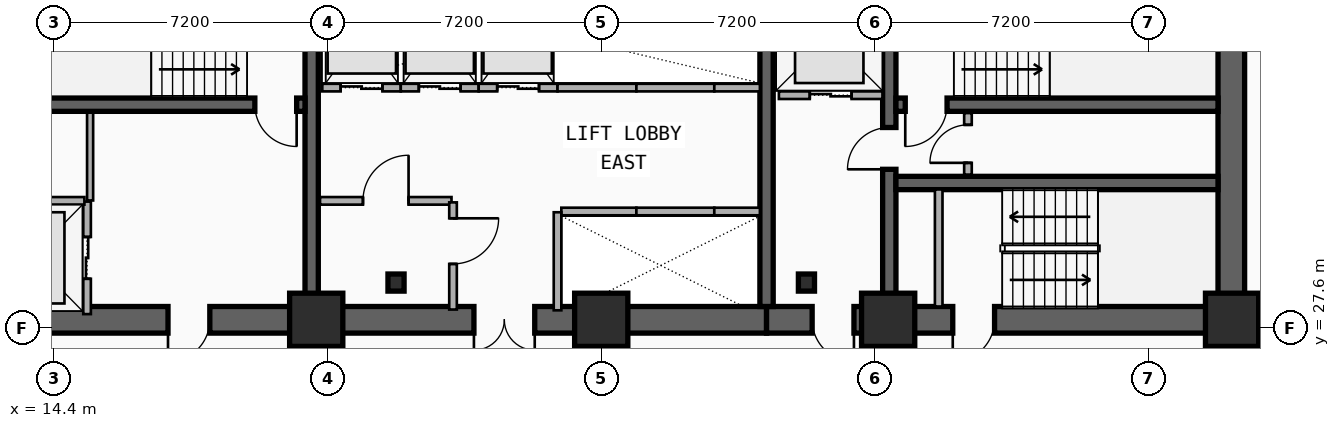
"""IFC4 building model, lengths in metres.
Left out: names, types, materials, properties, quantities, classifications, styles, units other than length and angle.
Written with IfcOpenShell. Run it as: python <this file> out.ifc"""

import sys

from ifc_helpers import new_model, si_unit, direction, frame, frame_2d, origin, origin_2d, place, context, subcontext, project, spatial, rectangle, i_section, extrude, element, fill, save


model = new_model("IFC4")
c1 = context("Model", 3, precision=1e-05, world=origin(), true_north=direction((0.0, 1.0)))
c2 = subcontext(c1, "Body", "Model", "MODEL_VIEW")
j1 = project(units=[si_unit("LENGTHUNIT", "METRE"), si_unit("PLANEANGLEUNIT", "RADIAN")], contexts=[c1])
p1 = place(None, origin())
s1 = spatial("IfcSite", under=j1, at=p1, CompositionType="ELEMENT")
p2 = place(p1, origin())
s2 = spatial("IfcBuilding", under=s1, at=p2, CompositionType="ELEMENT")
p3 = place(p2, frame((0.0, 0.0, 50.0)))
s3 = spatial("IfcBuildingStorey", under=s2, at=p3, CompositionType="ELEMENT", Elevation=50.0)
p4 = place(p3, frame((21.18, 27.82, 0.0), z_axis=(0.0, 0.0, 1.0), x_axis=(-1.0, 0.0, 0.0)))
e1 = element("IfcWall", 1, at=p4, inside=s3, PredefinedType="SHEAR", context=c2, shape_type="SweptSolid", body=[
    extrude(rectangle(XDim=9.03, YDim=0.7, at=frame_2d((4.515, 0.0))), origin(), (0.0, 0.0, 1.0), 3.5),
])
p5 = place(p4, frame((2.68, 0.0, 0.0)))
e2 = element("IfcOpeningElement", 2, at=p5, cuts=e1, PredefinedType="OPENING", context=c2, shape_type="SweptSolid", body=[
    extrude(rectangle(XDim=1.1, YDim=2.15, at=frame_2d((0.55, 1.075))), frame((0.0, 0.36, 0.0), z_axis=(0.0, -1.0, 0.0), x_axis=(1.0, 0.0, 0.0)), (0.0, 0.0, 1.0), 0.72),
])
p6 = place(p3, frame((33.15, 27.82, 0.0), z_axis=(0.0, 0.0, 1.0), x_axis=(-1.0, 0.0, 0.0)))
e3 = element("IfcWall", 3, at=p6, inside=s3, PredefinedType="SHEAR", context=c2, shape_type="SweptSolid", body=[
    extrude(rectangle(XDim=11.97, YDim=0.7, at=frame_2d((5.985, 0.0))), origin(), (0.0, 0.0, 1.0), 3.5),
])
p7 = place(p6, frame((6.1, 0.0, 0.0)))
e4 = element("IfcOpeningElement", 4, at=p7, cuts=e3, PredefinedType="OPENING", context=c2, shape_type="SweptSolid", body=[
    extrude(rectangle(XDim=1.6, YDim=2.2, at=frame_2d((0.8, 1.1))), frame((0.0, 0.36, 0.0), z_axis=(0.0, -1.0, 0.0), x_axis=(1.0, 0.0, 0.0)), (0.0, 0.0, 1.0), 0.72),
])
p8 = place(p3, frame((45.38, 27.82, 0.0), z_axis=(0.0, 0.0, 1.0), x_axis=(-1.0, 0.0, 0.0)))
e5 = element("IfcWall", 5, at=p8, inside=s3, PredefinedType="SHEAR", context=c2, shape_type="SweptSolid", body=[
    extrude(rectangle(XDim=12.23, YDim=0.7, at=frame_2d((6.115, 0.0))), origin(), (0.0, 0.0, 1.0), 3.5),
])
p9 = place(p8, frame((9.93, 0.0, 0.0)))
e6 = element("IfcOpeningElement", 6, at=p9, cuts=e5, PredefinedType="OPENING", context=c2, shape_type="SweptSolid", body=[
    extrude(rectangle(XDim=1.1, YDim=2.15, at=frame_2d((0.55, 1.075))), frame((0.0, 0.36, 0.0), z_axis=(0.0, -1.0, 0.0), x_axis=(1.0, 0.0, 0.0)), (0.0, 0.0, 1.0), 0.72),
])
p10 = place(p8, frame((6.23, 0.0, 0.0)))
e7 = element("IfcOpeningElement", 7, at=p10, cuts=e5, PredefinedType="OPENING", context=c2, shape_type="SweptSolid", body=[
    extrude(rectangle(XDim=1.1, YDim=2.15, at=frame_2d((0.55, 1.075))), frame((0.0, 0.36, 0.0), z_axis=(0.0, -1.0, 0.0), x_axis=(1.0, 0.0, 0.0)), (0.0, 0.0, 1.0), 0.72),
])
p11 = place(p3, frame((45.38, 28.17, 0.0), z_axis=(0.0, 0.0, 1.0), x_axis=(0.0, 1.0, 0.0)))
e8 = element("IfcWall", 8, at=p11, inside=s3, PredefinedType="SHEAR", context=c2, shape_type="SweptSolid", body=[
    extrude(rectangle(XDim=8.53, YDim=0.7, at=frame_2d((4.265, 0.0))), origin(), (0.0, 0.0, 1.0), 3.5),
])
for number, where, z_axis, x_axis in (
    (9, (21.18, 28.17, 0.0), (0.0, 0.0, 1.0), (0.0, 1.0, 0.0)),
    (10, (33.15, 28.17, 0.0), (0.0, 0.0, 1.0), (0.0, 1.0, 0.0)),
):
    element("IfcWall", number, at=place(p3, frame(where, z_axis=z_axis, x_axis=x_axis)), inside=s3, PredefinedType="SHEAR", context=c2, shape_type="SweptSolid", body=[
        extrude(rectangle(XDim=8.53, YDim=0.35, at=frame_2d((4.265, 0.0))), origin(), (0.0, 0.0, 1.0), 3.5),
    ])
p12 = place(p3, frame((36.38, 28.17, 0.0), z_axis=(0.0, 0.0, 1.0), x_axis=(0.0, 1.0, 0.0)))
e11 = element("IfcWall", 11, at=p12, inside=s3, PredefinedType="SHEAR", context=c2, shape_type="SweptSolid", body=[
    extrude(rectangle(XDim=8.53, YDim=0.35, at=frame_2d((4.265, 0.0))), origin(), (0.0, 0.0, 1.0), 3.5),
])
p13 = place(p12, frame((3.61, 0.0, 0.0)))
e12 = element("IfcOpeningElement", 12, at=p13, cuts=e11, PredefinedType="OPENING", context=c2, shape_type="SweptSolid", body=[
    extrude(rectangle(XDim=1.1, YDim=2.15, at=frame_2d((0.55, 1.075))), frame((0.0, 0.185, 0.0), z_axis=(0.0, -1.0, 0.0), x_axis=(1.0, 0.0, 0.0)), (0.0, 0.0, 1.0), 0.37),
])
p14 = place(p3, frame((21.005, 33.48, 0.0), z_axis=(0.0, 0.0, 1.0), x_axis=(-1.0, 0.0, 0.0)))
e13 = element("IfcWall", 13, at=p14, inside=s3, PredefinedType="SHEAR", context=c2, shape_type="SweptSolid", body=[
    extrude(rectangle(XDim=8.505, YDim=0.35, at=frame_2d((4.252, 0.0))), origin(), (0.0, 0.0, 1.0), 3.5),
])
p15 = place(p14, frame((0.22, 0.0, 0.0)))
e14 = element("IfcOpeningElement", 14, at=p15, cuts=e13, PredefinedType="OPENING", context=c2, shape_type="SweptSolid", body=[
    extrude(rectangle(XDim=1.1, YDim=2.15, at=frame_2d((0.55, 1.075))), frame((0.0, 0.185, 0.0), z_axis=(0.0, -1.0, 0.0), x_axis=(1.0, 0.0, 0.0)), (0.0, 0.0, 1.0), 0.37),
])
p16 = place(p3, frame((45.03, 33.48, 0.0), z_axis=(0.0, 0.0, 1.0), x_axis=(-1.0, 0.0, 0.0)))
e15 = element("IfcWall", 15, at=p16, inside=s3, PredefinedType="SHEAR", context=c2, shape_type="SweptSolid", body=[
    extrude(rectangle(XDim=8.475, YDim=0.35, at=frame_2d((4.238, 0.0))), origin(), (0.0, 0.0, 1.0), 3.5),
])
p17 = place(p16, frame((7.13, 0.0, 0.0)))
e16 = element("IfcOpeningElement", 16, at=p17, cuts=e15, PredefinedType="OPENING", context=c2, shape_type="SweptSolid", body=[
    extrude(rectangle(XDim=1.1, YDim=2.15, at=frame_2d((0.55, 1.075))), frame((0.0, 0.185, 0.0), z_axis=(0.0, -1.0, 0.0), x_axis=(1.0, 0.0, 0.0)), (0.0, 0.0, 1.0), 0.37),
])
p18 = place(p3, frame((36.555, 31.42, 0.0), z_axis=(0.0, 0.0, 1.0), x_axis=(1.0, 0.0, 0.0)))
e17 = element("IfcWall", 17, at=p18, inside=s3, PredefinedType="SHEAR", context=c2, shape_type="SweptSolid", body=[
    extrude(rectangle(XDim=8.475, YDim=0.35, at=frame_2d((4.238, 0.0))), origin(), (0.0, 0.0, 1.0), 3.5),
])
for number, where, z_axis, x_axis in (
    (18, (23.4, 28.8, 0.0), (0.0, 0.0, 1.0), (1.0, 0.0, 0.0)),
    (19, (34.2, 28.8, 0.0), (0.0, 0.0, 1.0), (1.0, 0.0, 0.0)),
):
    element("IfcColumn", number, at=place(p3, frame(where, z_axis=z_axis, x_axis=x_axis)), inside=s3, PredefinedType="COLUMN", context=c2, shape_type="SweptSolid", body=[
        extrude(i_section(OverallWidth=0.424, OverallDepth=0.45, WebThickness=0.041, FlangeThickness=0.065, FilletRadius=0.015, at=origin_2d()), origin(), (0.0, 0.0, 1.0), 3.5),
    ])
for number, where, z_axis, x_axis in (
    (20, (21.3, 27.82, 0.0), (0.0, 0.0, 1.0), (1.0, 0.0, 0.0)),
    (21, (28.8, 27.82, 0.0), (0.0, 0.0, 1.0), (1.0, 0.0, 0.0)),
    (22, (36.35, 27.82, 0.0), (0.0, 0.0, 1.0), (1.0, 0.0, 0.0)),
    (23, (45.4, 27.82, 0.0), (0.0, 0.0, 1.0), (1.0, 0.0, 0.0)),
):
    element("IfcColumn", number, at=place(p3, frame(where, z_axis=z_axis, x_axis=x_axis)), inside=s3, PredefinedType="COLUMN", context=c2, shape_type="SweptSolid", body=[
        extrude(rectangle(XDim=1.4, YDim=1.4, at=origin_2d()), origin(), (0.0, 0.0, 1.0), 3.5),
    ])
p19 = place(p3, frame((15.27, 27.97, 0.0), z_axis=(0.0, 0.0, 1.0), x_axis=(0.0, 1.0, 0.0)))
e24 = element("IfcWall", 24, at=p19, inside=s3, PredefinedType="PARTITIONING", context=c2, shape_type="SweptSolid", body=[
    extrude(rectangle(XDim=2.96, YDim=0.2, at=frame_2d((1.48, 0.0))), origin(), (0.0, 0.0, 1.0), 2.212),
])
p20 = place(p19, frame((0.93, 0.0, 0.0)))
e25 = element("IfcOpeningElement", 25, at=p20, cuts=e24, PredefinedType="OPENING", context=c2, shape_type="SweptSolid", body=[
    extrude(rectangle(XDim=1.1, YDim=2.15, at=frame_2d((0.55, 1.075))), frame((0.0, 0.11, 0.0), z_axis=(0.0, -1.0, 0.0), x_axis=(1.0, 0.0, 0.0)), (0.0, 0.0, 1.0), 0.22),
])
p21 = place(p3, frame((12.45, 30.95, 0.0), z_axis=(0.0, 0.0, 1.0), x_axis=(1.0, 0.0, 0.0)))
e26 = element("IfcWall", 26, at=p21, inside=s3, PredefinedType="PARTITIONING", context=c2, shape_type="SweptSolid", body=[
    extrude(rectangle(XDim=2.75, YDim=0.2, at=frame_2d((1.375, 0.0))), origin(), (0.0, 0.0, 1.0), 2.212),
])
p22 = place(p3, frame((33.475, 33.73, 0.0), z_axis=(0.0, 0.0, 1.0), x_axis=(1.0, 0.0, 0.0)))
e27 = element("IfcWall", 27, at=p22, inside=s3, PredefinedType="PARTITIONING", context=c2, shape_type="SweptSolid", body=[
    extrude(rectangle(XDim=2.725, YDim=0.2, at=frame_2d((1.362, 0.0))), origin(), (0.0, 0.0, 1.0), 2.212),
])
p23 = place(p22, frame((0.812, 0.0, 0.0)))
e28 = element("IfcOpeningElement", 28, at=p23, cuts=e27, PredefinedType="OPENING", context=c2, shape_type="SweptSolid", body=[
    extrude(rectangle(XDim=1.1, YDim=2.15, at=frame_2d((0.55, 1.075))), frame((0.0, 0.11, 0.0), z_axis=(0.0, -1.0, 0.0), x_axis=(1.0, 0.0, 0.0)), (0.0, 0.0, 1.0), 0.22),
])
p24 = place(p3, frame((27.75, 30.67, 0.0), z_axis=(0.0, 0.0, 1.0), x_axis=(1.0, 0.0, 0.0)))
e29 = element("IfcWall", 29, at=p24, inside=s3, PredefinedType="PARTITIONING", context=c2, shape_type="SweptSolid", body=[
    extrude(rectangle(XDim=1.975, YDim=0.2, at=frame_2d((0.988, 0.0))), origin(), (0.0, 0.0, 1.0), 2.212),
])
p25 = place(p3, frame((27.65, 28.07, 0.0), z_axis=(0.0, 0.0, 1.0), x_axis=(0.0, 1.0, 0.0)))
e30 = element("IfcWall", 30, at=p25, inside=s3, PredefinedType="PARTITIONING", context=c2, shape_type="SweptSolid", body=[
    extrude(rectangle(XDim=2.58, YDim=0.2, at=frame_2d((1.29, 0.0))), origin(), (0.0, 0.0, 1.0), 2.212),
])
p26 = place(p3, frame((29.725, 30.67, 0.0), z_axis=(0.0, 0.0, 1.0), x_axis=(1.0, 0.0, 0.0)))
e31 = element("IfcWall", 31, at=p26, inside=s3, PredefinedType="PARTITIONING", context=c2, shape_type="SweptSolid", body=[
    extrude(rectangle(XDim=2.05, YDim=0.2, at=frame_2d((1.025, 0.0))), origin(), (0.0, 0.0, 1.0), 2.62),
])
p27 = place(p3, frame((31.775, 30.67, 0.0), z_axis=(0.0, 0.0, 1.0), x_axis=(1.0, 0.0, 0.0)))
e32 = element("IfcWall", 32, at=p27, inside=s3, PredefinedType="PARTITIONING", context=c2, shape_type="SweptSolid", body=[
    extrude(rectangle(XDim=1.2, YDim=0.2, at=frame_2d((0.6, 0.0))), origin(), (0.0, 0.0, 1.0), 2.62),
])
p28 = place(p3, frame((21.46, 33.93, 0.0), z_axis=(0.0, 0.0, 1.0), x_axis=(1.0, 0.0, 0.0)))
e33 = element("IfcWall", 33, at=p28, inside=s3, PredefinedType="PARTITIONING", context=c2, shape_type="SweptSolid", body=[
    extrude(rectangle(XDim=2.065, YDim=0.2, at=frame_2d((1.032, 0.0))), origin(), (0.0, 0.0, 1.0), 2.212),
])
p29 = place(p28, frame((0.482, 0.0, 0.0)))
e34 = element("IfcOpeningElement", 34, at=p29, cuts=e33, PredefinedType="OPENING", context=c2, shape_type="SweptSolid", body=[
    extrude(rectangle(XDim=1.1, YDim=2.15, at=frame_2d((0.55, 1.075))), frame((0.0, 0.11, 0.0), z_axis=(0.0, -1.0, 0.0), x_axis=(1.0, 0.0, 0.0)), (0.0, 0.0, 1.0), 0.22),
])
p30 = place(p3, frame((23.525, 33.93, 0.0), z_axis=(0.0, 0.0, 1.0), x_axis=(1.0, 0.0, 0.0)))
e35 = element("IfcWall", 35, at=p30, inside=s3, PredefinedType="PARTITIONING", context=c2, shape_type="SweptSolid", body=[
    extrude(rectangle(XDim=2.05, YDim=0.2, at=frame_2d((1.025, 0.0))), origin(), (0.0, 0.0, 1.0), 3.24),
])
p31 = place(p30, frame((0.475, 0.0, 0.0)))
e36 = element("IfcOpeningElement", 36, at=p31, cuts=e35, PredefinedType="OPENING", context=c2, shape_type="SweptSolid", body=[
    extrude(rectangle(XDim=1.1, YDim=2.15, at=frame_2d((0.55, 1.075))), frame((0.0, 0.11, 0.0), z_axis=(0.0, -1.0, 0.0), x_axis=(1.0, 0.0, 0.0)), (0.0, 0.0, 1.0), 0.22),
])
p32 = place(p3, frame((25.575, 33.93, 0.0), z_axis=(0.0, 0.0, 1.0), x_axis=(1.0, 0.0, 0.0)))
e37 = element("IfcWall", 37, at=p32, inside=s3, PredefinedType="PARTITIONING", context=c2, shape_type="SweptSolid", body=[
    extrude(rectangle(XDim=2.075, YDim=0.2, at=frame_2d((1.038, 0.0))), origin(), (0.0, 0.0, 1.0), 3.24),
])
p33 = place(p32, frame((0.488, 0.0, 0.0)))
e38 = element("IfcOpeningElement", 38, at=p33, cuts=e37, PredefinedType="OPENING", context=c2, shape_type="SweptSolid", body=[
    extrude(rectangle(XDim=1.1, YDim=2.15, at=frame_2d((0.55, 1.075))), frame((0.0, 0.11, 0.0), z_axis=(0.0, -1.0, 0.0), x_axis=(1.0, 0.0, 0.0)), (0.0, 0.0, 1.0), 0.22),
])
p34 = place(p3, frame((27.65, 33.93, 0.0), z_axis=(0.0, 0.0, 1.0), x_axis=(1.0, 0.0, 0.0)))
e39 = element("IfcWall", 39, at=p34, inside=s3, PredefinedType="PARTITIONING", context=c2, shape_type="SweptSolid", body=[
    extrude(rectangle(XDim=2.075, YDim=0.2, at=frame_2d((1.038, 0.0))), origin(), (0.0, 0.0, 1.0), 2.212),
])
p35 = place(p3, frame((29.725, 33.93, 0.0), z_axis=(0.0, 0.0, 1.0), x_axis=(1.0, 0.0, 0.0)))
e40 = element("IfcWall", 40, at=p35, inside=s3, PredefinedType="PARTITIONING", context=c2, shape_type="SweptSolid", body=[
    extrude(rectangle(XDim=2.05, YDim=0.2, at=frame_2d((1.025, 0.0))), origin(), (0.0, 0.0, 1.0), 3.24),
])
p36 = place(p3, frame((31.775, 33.93, 0.0), z_axis=(0.0, 0.0, 1.0), x_axis=(1.0, 0.0, 0.0)))
e41 = element("IfcWall", 41, at=p36, inside=s3, PredefinedType="PARTITIONING", context=c2, shape_type="SweptSolid", body=[
    extrude(rectangle(XDim=1.2, YDim=0.2, at=frame_2d((0.6, 0.0))), origin(), (0.0, 0.0, 1.0), 3.24),
])
p37 = place(p3, frame((37.68, 28.17, 0.0), z_axis=(0.0, 0.0, 1.0), x_axis=(0.0, 1.0, 0.0)))
e42 = element("IfcWall", 42, at=p37, inside=s3, PredefinedType="PARTITIONING", context=c2, shape_type="SweptSolid", body=[
    extrude(rectangle(XDim=3.08, YDim=0.2, at=frame_2d((1.54, 0.0))), origin(), (0.0, 0.0, 1.0), 2.62),
])
p38 = place(p3, frame((38.45, 31.64, 0.0), z_axis=(0.0, 0.0, 1.0), x_axis=(0.0, 1.0, 0.0)))
e43 = element("IfcWall", 43, at=p38, inside=s3, PredefinedType="PARTITIONING", context=c2, shape_type="SweptSolid", body=[
    extrude(rectangle(XDim=1.62, YDim=0.2, at=frame_2d((0.81, 0.0))), origin(), (0.0, 0.0, 1.0), 3.24),
])
p39 = place(p38, frame((0.31, 0.0, 0.0)))
e44 = element("IfcOpeningElement", 44, at=p39, cuts=e43, PredefinedType="OPENING", context=c2, shape_type="SweptSolid", body=[
    extrude(rectangle(XDim=1.0, YDim=2.15, at=frame_2d((0.5, 1.075))), frame((0.0, 0.11, 0.0), z_axis=(0.0, -1.0, 0.0), x_axis=(1.0, 0.0, 0.0)), (0.0, 0.0, 1.0), 0.22),
])
p40 = place(p3, frame((21.4, 30.95, 0.0), z_axis=(0.0, 0.0, 1.0), x_axis=(1.0, 0.0, 0.0)))
e45 = element("IfcWall", 45, at=p40, inside=s3, PredefinedType="PARTITIONING", context=c2, shape_type="SweptSolid", body=[
    extrude(rectangle(XDim=3.46, YDim=0.2, at=frame_2d((1.73, 0.0))), origin(), (0.0, 0.0, 1.0), 2.28),
])
p41 = place(p40, frame((1.13, 0.0, 0.0)))
e46 = element("IfcOpeningElement", 46, at=p41, cuts=e45, PredefinedType="OPENING", context=c2, shape_type="SweptSolid", body=[
    extrude(rectangle(XDim=1.2, YDim=2.15, at=frame_2d((0.6, 1.075))), frame((0.0, 0.11, 0.0), z_axis=(0.0, -1.0, 0.0), x_axis=(1.0, 0.0, 0.0)), (0.0, 0.0, 1.0), 0.22),
])
p42 = place(p3, frame((24.9, 30.91, 0.0), z_axis=(0.0, 0.0, 1.0), x_axis=(0.0, -1.0, 0.0)))
e47 = element("IfcWall", 47, at=p42, inside=s3, PredefinedType="PARTITIONING", context=c2, shape_type="SweptSolid", body=[
    extrude(rectangle(XDim=2.82, YDim=0.2, at=frame_2d((1.41, 0.0))), origin(), (0.0, 0.0, 1.0), 2.62),
])
p43 = place(p42, frame((0.419, 0.0, 0.0)))
e48 = element("IfcOpeningElement", 48, at=p43, cuts=e47, PredefinedType="OPENING", context=c2, shape_type="SweptSolid", body=[
    extrude(rectangle(XDim=1.2, YDim=2.15, at=frame_2d((0.6, 1.075))), frame((0.0, 0.11, 0.0), z_axis=(0.0, -1.0, 0.0), x_axis=(1.0, 0.0, 0.0)), (0.0, 0.0, 1.0), 0.22),
])
p44 = place(p3, frame((15.35, 30.96, 0.0), z_axis=(0.0, 0.0, 1.0), x_axis=(0.0, 1.0, 0.0)))
e49 = element("IfcWall", 49, at=p44, inside=s3, PredefinedType="PARTITIONING", context=c2, shape_type="SweptSolid", body=[
    extrude(rectangle(XDim=2.31, YDim=0.16, at=frame_2d((1.155, 0.0))), origin(), (0.0, 0.0, 1.0), 3.24),
])
p45 = place(p3, frame((45.41, 27.6, 0.0), z_axis=(0.0, 0.0, 1.0), x_axis=(1.0, 0.0, 0.0)))
e50 = element("IfcWall", 50, at=p45, inside=s3, PredefinedType="PARTITIONING", context=c2, shape_type="SweptSolid", body=[
    extrude(rectangle(XDim=0.91, YDim=0.16, at=frame_2d((0.455, 0.0))), origin(), (0.0, 0.0, 1.0), 2.28),
])
p46 = place(p20, origin())
e51 = element("IfcDoor", 51, at=p46, inside=s3, OperationType="DOUBLE_DOOR_SLIDING", PredefinedType="DOOR", context=c2, shape_type="SweptSolid", body=[
    extrude(rectangle(XDim=1.1, YDim=2.15, at=frame_2d((0.55, 1.075))), frame((0.0, 0.025, 0.0), z_axis=(0.0, -1.0, 0.0), x_axis=(1.0, 0.0, 0.0)), (0.0, 0.0, 1.0), 0.05),
])
fill(e25, e51)
p47 = place(p23, origin())
e52 = element("IfcDoor", 52, at=p47, inside=s3, OperationType="DOUBLE_DOOR_SLIDING", PredefinedType="DOOR", context=c2, shape_type="SweptSolid", body=[
    extrude(rectangle(XDim=1.1, YDim=2.15, at=frame_2d((0.55, 1.075))), frame((0.0, 0.025, 0.0), z_axis=(0.0, -1.0, 0.0), x_axis=(1.0, 0.0, 0.0)), (0.0, 0.0, 1.0), 0.05),
])
fill(e28, e52)
p48 = place(p29, origin())
e53 = element("IfcDoor", 53, at=p48, inside=s3, OperationType="DOUBLE_DOOR_SLIDING", PredefinedType="DOOR", context=c2, shape_type="SweptSolid", body=[
    extrude(rectangle(XDim=1.1, YDim=2.15, at=frame_2d((0.55, 1.075))), frame((0.0, 0.025, 0.0), z_axis=(0.0, -1.0, 0.0), x_axis=(1.0, 0.0, 0.0)), (0.0, 0.0, 1.0), 0.05),
])
fill(e34, e53)
p49 = place(p31, origin())
e54 = element("IfcDoor", 54, at=p49, inside=s3, OperationType="DOUBLE_DOOR_SLIDING", PredefinedType="DOOR", context=c2, shape_type="SweptSolid", body=[
    extrude(rectangle(XDim=1.1, YDim=2.15, at=frame_2d((0.55, 1.075))), frame((0.0, 0.025, 0.0), z_axis=(0.0, -1.0, 0.0), x_axis=(1.0, 0.0, 0.0)), (0.0, 0.0, 1.0), 0.05),
])
fill(e36, e54)
p50 = place(p33, origin())
e55 = element("IfcDoor", 55, at=p50, inside=s3, OperationType="DOUBLE_DOOR_SLIDING", PredefinedType="DOOR", context=c2, shape_type="SweptSolid", body=[
    extrude(rectangle(XDim=1.1, YDim=2.15, at=frame_2d((0.55, 1.075))), frame((0.0, 0.025, 0.0), z_axis=(0.0, -1.0, 0.0), x_axis=(1.0, 0.0, 0.0)), (0.0, 0.0, 1.0), 0.05),
])
fill(e38, e55)
p51 = place(p15, origin())
e56 = element("IfcDoor", 56, at=p51, inside=s3, OperationType="SINGLE_SWING_LEFT", PredefinedType="DOOR", context=c2, shape_type="SweptSolid", body=[
    extrude(rectangle(XDim=1.1, YDim=2.15, at=frame_2d((0.55, 1.075))), frame((0.0, 0.025, 0.0), z_axis=(0.0, -1.0, 0.0), x_axis=(1.0, 0.0, 0.0)), (0.0, 0.0, 1.0), 0.05),
])
fill(e14, e56)
p52 = place(p5, origin())
e57 = element("IfcDoor", 57, at=p52, inside=s3, OperationType="SINGLE_SWING_RIGHT", PredefinedType="DOOR", context=c2, shape_type="SweptSolid", body=[
    extrude(rectangle(XDim=1.1, YDim=2.15, at=frame_2d((0.55, 1.075))), frame((0.0, 0.025, 0.0), z_axis=(0.0, -1.0, 0.0), x_axis=(1.0, 0.0, 0.0)), (0.0, 0.0, 1.0), 0.05),
])
fill(e2, e57)
p53 = place(p17, origin())
e58 = element("IfcDoor", 58, at=p53, inside=s3, OperationType="SINGLE_SWING_RIGHT", PredefinedType="DOOR", context=c2, shape_type="SweptSolid", body=[
    extrude(rectangle(XDim=1.1, YDim=2.15, at=frame_2d((0.55, 1.075))), frame((0.0, 0.025, 0.0), z_axis=(0.0, -1.0, 0.0), x_axis=(1.0, 0.0, 0.0)), (0.0, 0.0, 1.0), 0.05),
])
fill(e16, e58)
p54 = place(p13, origin())
e59 = element("IfcDoor", 59, at=p54, inside=s3, OperationType="SINGLE_SWING_LEFT", PredefinedType="DOOR", context=c2, shape_type="SweptSolid", body=[
    extrude(rectangle(XDim=1.1, YDim=2.15, at=frame_2d((0.55, 1.075))), frame((0.0, 0.025, 0.0), z_axis=(0.0, -1.0, 0.0), x_axis=(1.0, 0.0, 0.0)), (0.0, 0.0, 1.0), 0.05),
])
fill(e12, e59)
p55 = place(p9, origin())
e60 = element("IfcDoor", 60, at=p55, inside=s3, OperationType="SINGLE_SWING_LEFT", PredefinedType="DOOR", context=c2, shape_type="SweptSolid", body=[
    extrude(rectangle(XDim=1.1, YDim=2.15, at=frame_2d((0.55, 1.075))), frame((0.0, 0.025, 0.0), z_axis=(0.0, -1.0, 0.0), x_axis=(1.0, 0.0, 0.0)), (0.0, 0.0, 1.0), 0.05),
])
fill(e6, e60)
p56 = place(p10, origin())
e61 = element("IfcDoor", 61, at=p56, inside=s3, OperationType="SINGLE_SWING_RIGHT", PredefinedType="DOOR", context=c2, shape_type="SweptSolid", body=[
    extrude(rectangle(XDim=1.1, YDim=2.15, at=frame_2d((0.55, 1.075))), frame((0.0, 0.025, 0.0), z_axis=(0.0, -1.0, 0.0), x_axis=(1.0, 0.0, 0.0)), (0.0, 0.0, 1.0), 0.05),
])
fill(e7, e61)
p57 = place(p7, origin())
e62 = element("IfcDoor", 62, at=p57, inside=s3, OperationType="SINGLE_SWING_LEFT", PredefinedType="DOOR", context=c2, shape_type="SweptSolid", body=[
    extrude(rectangle(XDim=1.6, YDim=2.2, at=frame_2d((0.8, 1.1))), frame((0.0, 0.025, 0.0), z_axis=(0.0, -1.0, 0.0), x_axis=(1.0, 0.0, 0.0)), (0.0, 0.0, 1.0), 0.05),
])
fill(e4, e62)
p58 = place(p39, origin())
e63 = element("IfcDoor", 63, at=p58, inside=s3, OperationType="SINGLE_SWING_LEFT", PredefinedType="DOOR", context=c2, shape_type="SweptSolid", body=[
    extrude(rectangle(XDim=1.0, YDim=2.15, at=frame_2d((0.5, 1.075))), frame((0.0, 0.025, 0.0), z_axis=(0.0, -1.0, 0.0), x_axis=(1.0, 0.0, 0.0)), (0.0, 0.0, 1.0), 0.05),
])
fill(e44, e63)
p59 = place(p41, origin())
e64 = element("IfcDoor", 64, at=p59, inside=s3, OperationType="SINGLE_SWING_RIGHT", PredefinedType="DOOR", context=c2, shape_type="SweptSolid", body=[
    extrude(rectangle(XDim=1.2, YDim=2.15, at=frame_2d((0.6, 1.075))), frame((0.0, 0.025, 0.0), z_axis=(0.0, -1.0, 0.0), x_axis=(1.0, 0.0, 0.0)), (0.0, 0.0, 1.0), 0.05),
])
fill(e46, e64)
p60 = place(p43, origin())
e65 = element("IfcDoor", 65, at=p60, inside=s3, OperationType="SINGLE_SWING_LEFT", PredefinedType="DOOR", context=c2, shape_type="SweptSolid", body=[
    extrude(rectangle(XDim=1.2, YDim=2.15, at=frame_2d((0.6, 1.075))), frame((0.0, 0.025, 0.0), z_axis=(0.0, -1.0, 0.0), x_axis=(1.0, 0.0, 0.0)), (0.0, 0.0, 1.0), 0.05),
])
fill(e48, e65)
save(model, sys.argv[1])
